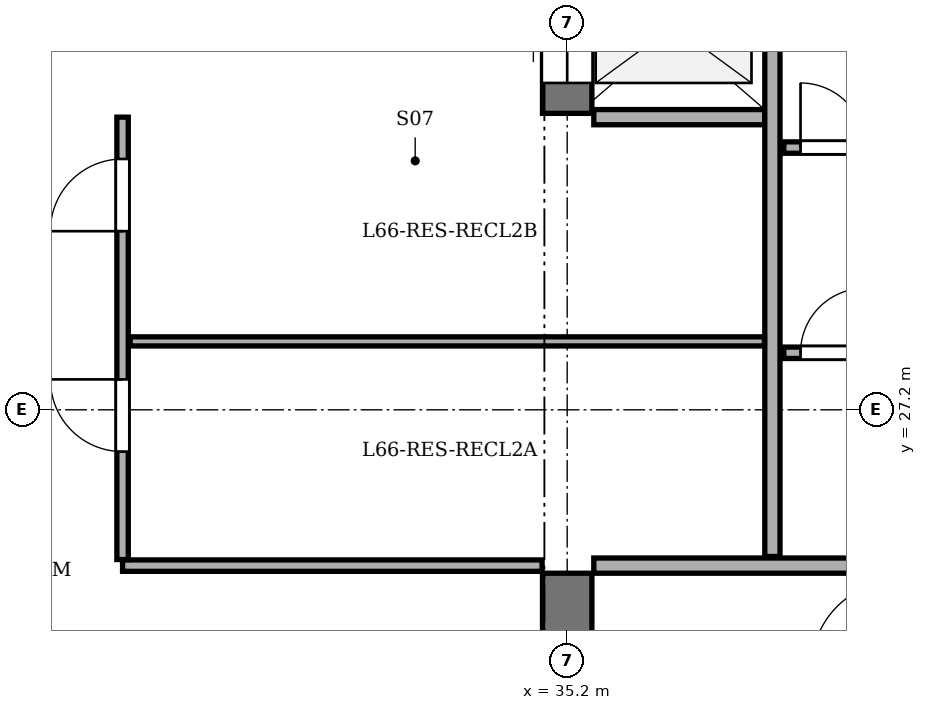
"""IFC4 building model, lengths in metres.
Left out: names, types, materials, properties, quantities, classifications, styles, units other than length and angle.
Written with IfcOpenShell. Run it as: python <this file> out.ifc"""

import sys

from ifc_helpers import new_model, si_unit, direction, frame, frame_2d, origin, place, context, subcontext, project, spatial, rectangle, extrude, element, fill, save


model = new_model("IFC4")
c1 = context("Model", 3, precision=1e-05, world=origin(), true_north=direction((0.0, 1.0)))
c2 = subcontext(c1, "Body", "Model", "MODEL_VIEW")
j1 = project(units=[si_unit("LENGTHUNIT", "METRE"), si_unit("PLANEANGLEUNIT", "RADIAN")], contexts=[c1])
p1 = place(None, origin())
s1 = spatial("IfcSite", under=j1, at=p1, CompositionType="ELEMENT")
p2 = place(p1, origin())
s2 = spatial("IfcBuilding", under=s1, at=p2, CompositionType="ELEMENT")
p3 = place(p2, frame((0.0, 0.0, 251.7)))
s3 = spatial("IfcBuildingStorey", under=s2, at=p3, CompositionType="ELEMENT", Elevation=251.7)
p4 = place(p3, frame((35.2, 21.18, 0.0), z_axis=(0.0, 0.0, 1.0), x_axis=(0.0, 1.0, 0.0)))
e1 = element("IfcWall", 1, at=p4, inside=s3, PredefinedType="SHEAR", context=c2, shape_type="SweptSolid", body=[
    extrude(rectangle(XDim=3.87, YDim=0.65, at=frame_2d((1.935, 0.0))), origin(), (0.0, 0.0, 1.0), 3.1),
])
p5 = place(p4, frame((1.42, 0.0, 0.0)))
e2 = element("IfcOpeningElement", 2, at=p5, cuts=e1, PredefinedType="OPENING", context=c2, shape_type="SweptSolid", body=[
    extrude(rectangle(XDim=1.2, YDim=2.15, at=frame_2d((0.6, 1.075))), frame((0.0, 0.335, 0.0), z_axis=(0.0, -1.0, 0.0), x_axis=(1.0, 0.0, 0.0)), (0.0, 0.0, 1.0), 0.67),
])
p6 = place(p3, frame((35.2, 31.1, 0.0), z_axis=(0.0, 0.0, 1.0), x_axis=(0.0, 1.0, 0.0)))
e3 = element("IfcWall", 3, at=p6, inside=s3, PredefinedType="SHEAR", context=c2, shape_type="SweptSolid", body=[
    extrude(rectangle(XDim=2.12, YDim=0.65, at=frame_2d((1.06, 0.0))), origin(), (0.0, 0.0, 1.0), 3.1),
])
p7 = place(p6, frame((0.4, 0.0, 0.0)))
e4 = element("IfcOpeningElement", 4, at=p7, cuts=e3, PredefinedType="OPENING", context=c2, shape_type="SweptSolid", body=[
    extrude(rectangle(XDim=1.1, YDim=2.1, at=frame_2d((0.55, 1.05))), frame((0.0, 0.335, 0.0), z_axis=(0.0, -1.0, 0.0), x_axis=(1.0, 0.0, 0.0)), (0.0, 0.0, 1.0), 0.67),
])
p8 = place(p3, frame((35.55, 25.15, 0.0), z_axis=(0.0, 0.0, 1.0), x_axis=(1.0, 0.0, 0.0)))
e5 = element("IfcWall", 5, at=p8, inside=s3, PredefinedType="SOLIDWALL", context=c2, shape_type="SweptSolid", body=[
    extrude(rectangle(XDim=3.85, YDim=0.2, at=frame_2d((1.925, 0.0))), origin(), (0.0, 0.0, 1.0), 3.1),
])
p9 = place(p3, frame((35.55, 31.05, 0.0), z_axis=(0.0, 0.0, 1.0), x_axis=(1.0, 0.0, 0.0)))
e6 = element("IfcWall", 6, at=p9, inside=s3, PredefinedType="SOLIDWALL", context=c2, shape_type="SweptSolid", body=[
    extrude(rectangle(XDim=2.25, YDim=0.2, at=frame_2d((1.125, 0.0))), origin(), (0.0, 0.0, 1.0), 3.1),
])
p10 = place(p3, frame((37.9, 25.27, 0.0), z_axis=(0.0, 0.0, 1.0), x_axis=(0.0, 1.0, 0.0)))
e7 = element("IfcWall", 7, at=p10, inside=s3, PredefinedType="SOLIDWALL", context=c2, shape_type="SweptSolid", body=[
    extrude(rectangle(XDim=7.995, YDim=0.2, at=frame_2d((3.998, 0.0))), origin(), (0.0, 0.0, 1.0), 3.1),
])
p11 = place(p3, frame((38.05, 27.95, 0.0), z_axis=(0.0, 0.0, 1.0), x_axis=(1.0, 0.0, 0.0)))
e8 = element("IfcWall", 8, at=p11, inside=s3, PredefinedType="PARTITIONING", context=c2, shape_type="SweptSolid", body=[
    extrude(rectangle(XDim=1.3, YDim=0.15, at=frame_2d((0.65, 0.0))), origin(), (0.0, 0.0, 1.0), 3.1),
])
p12 = place(p11, frame((0.22, 0.0, 0.0)))
e9 = element("IfcOpeningElement", 9, at=p12, cuts=e8, PredefinedType="OPENING", context=c2, shape_type="SweptSolid", body=[
    extrude(rectangle(XDim=0.85, YDim=2.02, at=frame_2d((0.425, 1.01))), frame((0.0, 0.085, 0.0), z_axis=(0.0, -1.0, 0.0), x_axis=(1.0, 0.0, 0.0)), (0.0, 0.0, 1.0), 0.17),
])
p13 = place(p3, frame((38.05, 30.65, 0.0), z_axis=(0.0, 0.0, 1.0), x_axis=(1.0, 0.0, 0.0)))
e10 = element("IfcWall", 10, at=p13, inside=s3, PredefinedType="PARTITIONING", context=c2, shape_type="SweptSolid", body=[
    extrude(rectangle(XDim=1.3, YDim=0.15, at=frame_2d((0.65, 0.0))), origin(), (0.0, 0.0, 1.0), 3.1),
])
p14 = place(p13, frame((0.22, 0.0, 0.0)))
e11 = element("IfcOpeningElement", 11, at=p14, cuts=e10, PredefinedType="OPENING", context=c2, shape_type="SweptSolid", body=[
    extrude(rectangle(XDim=0.85, YDim=2.02, at=frame_2d((0.425, 1.01))), frame((0.0, 0.085, 0.0), z_axis=(0.0, -1.0, 0.0), x_axis=(1.0, 0.0, 0.0)), (0.0, 0.0, 1.0), 0.17),
])
p15 = place(p3, frame((29.35, 25.15, 0.0), z_axis=(0.0, 0.0, 1.0), x_axis=(1.0, 0.0, 0.0)))
e12 = element("IfcWall", 12, at=p15, inside=s3, PredefinedType="PARTITIONING", context=c2, shape_type="SweptSolid", body=[
    extrude(rectangle(XDim=5.52, YDim=0.15, at=frame_2d((2.76, 0.0))), origin(), (0.0, 0.0, 1.0), 3.1),
])
p16 = place(p3, frame((29.35, 25.23, 0.0), z_axis=(0.0, 0.0, 1.0), x_axis=(0.0, 1.0, 0.0)))
e13 = element("IfcWall", 13, at=p16, inside=s3, PredefinedType="PARTITIONING", context=c2, shape_type="SweptSolid", body=[
    extrude(rectangle(XDim=5.82, YDim=0.15, at=frame_2d((2.91, 0.0))), origin(), (0.0, 0.0, 1.0), 3.1),
])
p17 = place(p16, frame((1.42, 0.0, 0.0)))
e14 = element("IfcOpeningElement", 14, at=p17, cuts=e13, PredefinedType="OPENING", context=c2, shape_type="SweptSolid", body=[
    extrude(rectangle(XDim=0.95, YDim=2.1, at=frame_2d((0.475, 1.05))), frame((0.0, 0.085, 0.0), z_axis=(0.0, -1.0, 0.0), x_axis=(1.0, 0.0, 0.0)), (0.0, 0.0, 1.0), 0.17),
])
p18 = place(p16, frame((4.32, 0.0, 0.0)))
e15 = element("IfcOpeningElement", 15, at=p18, cuts=e13, PredefinedType="OPENING", context=c2, shape_type="SweptSolid", body=[
    extrude(rectangle(XDim=0.95, YDim=2.1, at=frame_2d((0.475, 1.05))), frame((0.0, 0.085, 0.0), z_axis=(0.0, -1.0, 0.0), x_axis=(1.0, 0.0, 0.0)), (0.0, 0.0, 1.0), 0.17),
])
p19 = place(p3, frame((29.45, 28.1, 0.0), z_axis=(0.0, 0.0, 1.0), x_axis=(1.0, 0.0, 0.0)))
e16 = element("IfcWall", 16, at=p19, inside=s3, PredefinedType="PARTITIONING", context=c2, shape_type="SweptSolid", body=[
    extrude(rectangle(XDim=8.345, YDim=0.12, at=frame_2d((4.172, 0.0))), origin(), (0.0, 0.0, 1.0), 3.1),
])
p20 = place(p7, origin())
e17 = element("IfcDoor", 17, at=p20, inside=s3, OperationType="DOUBLE_DOOR_SLIDING", PredefinedType="DOOR", context=c2, shape_type="SweptSolid", body=[
    extrude(rectangle(XDim=1.1, YDim=2.1, at=frame_2d((0.55, 1.05))), frame((0.0, 0.025, 0.0), z_axis=(0.0, -1.0, 0.0), x_axis=(1.0, 0.0, 0.0)), (0.0, 0.0, 1.0), 0.05),
])
fill(e4, e17)
p21 = place(p12, origin())
e18 = element("IfcDoor", 18, at=p21, inside=s3, OperationType="SINGLE_SWING_RIGHT", PredefinedType="DOOR", context=c2, shape_type="SweptSolid", body=[
    extrude(rectangle(XDim=0.85, YDim=2.02, at=frame_2d((0.425, 1.01))), frame((0.0, 0.025, 0.0), z_axis=(0.0, -1.0, 0.0), x_axis=(1.0, 0.0, 0.0)), (0.0, 0.0, 1.0), 0.05),
])
fill(e9, e18)
p22 = place(p14, origin())
e19 = element("IfcDoor", 19, at=p22, inside=s3, OperationType="SINGLE_SWING_LEFT", PredefinedType="DOOR", context=c2, shape_type="SweptSolid", body=[
    extrude(rectangle(XDim=0.85, YDim=2.02, at=frame_2d((0.425, 1.01))), frame((0.0, 0.025, 0.0), z_axis=(0.0, -1.0, 0.0), x_axis=(1.0, 0.0, 0.0)), (0.0, 0.0, 1.0), 0.05),
])
fill(e11, e19)
p23 = place(p17, origin())
e20 = element("IfcDoor", 20, at=p23, inside=s3, OperationType="SINGLE_SWING_RIGHT", PredefinedType="DOOR", context=c2, shape_type="SweptSolid", body=[
    extrude(rectangle(XDim=0.95, YDim=2.1, at=frame_2d((0.475, 1.05))), frame((0.0, 0.025, 0.0), z_axis=(0.0, -1.0, 0.0), x_axis=(1.0, 0.0, 0.0)), (0.0, 0.0, 1.0), 0.05),
])
fill(e14, e20)
p24 = place(p18, origin())
e21 = element("IfcDoor", 21, at=p24, inside=s3, OperationType="SINGLE_SWING_LEFT", PredefinedType="DOOR", context=c2, shape_type="SweptSolid", body=[
    extrude(rectangle(XDim=0.95, YDim=2.1, at=frame_2d((0.475, 1.05))), frame((0.0, 0.025, 0.0), z_axis=(0.0, -1.0, 0.0), x_axis=(1.0, 0.0, 0.0)), (0.0, 0.0, 1.0), 0.05),
])
fill(e15, e21)
save(model, sys.argv[1])
